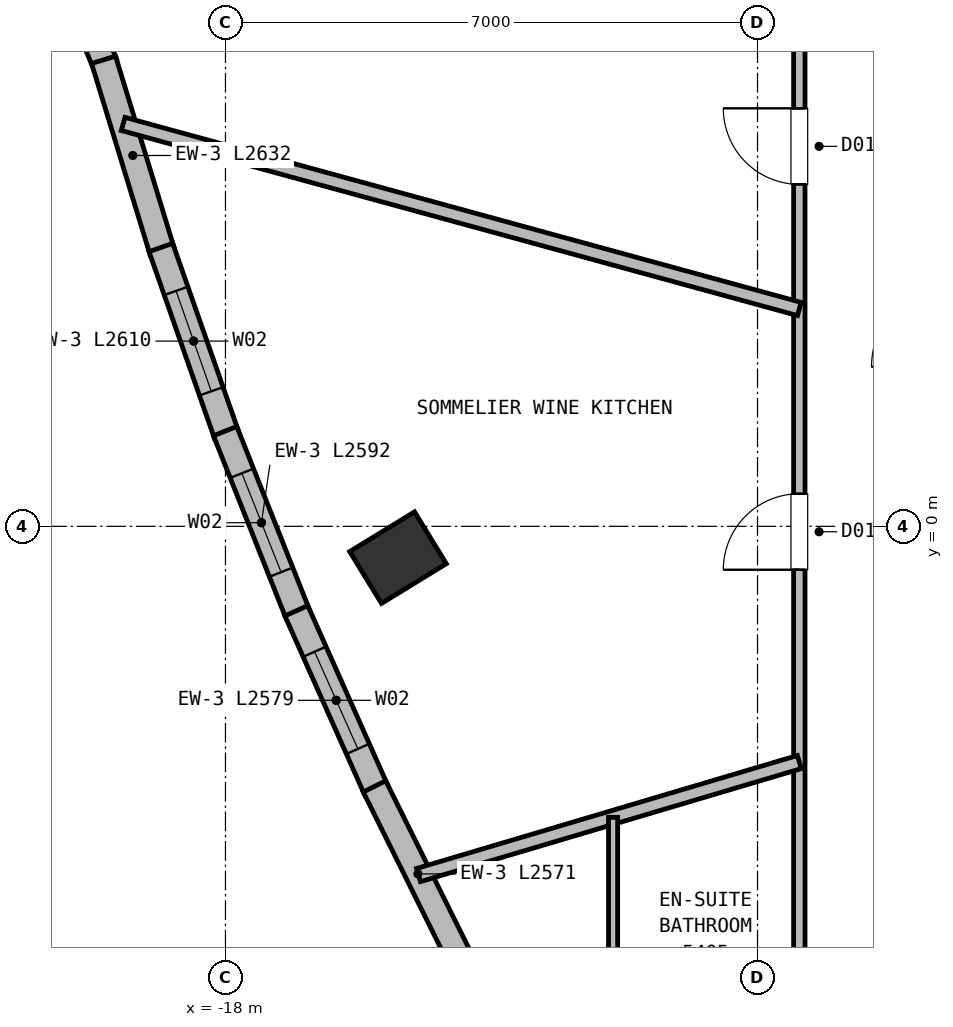
"""IFC4 building model, lengths in metres.
Left out: names, types, materials, properties, quantities, classifications, styles, units other than length and angle.
Written with IfcOpenShell. Run it as: python <this file> out.ifc"""

import sys

from ifc_helpers import new_model, si_unit, direction, frame, frame_2d, origin, origin_2d, place, context, subcontext, project, spatial, rectangle, extrude, element, fill, save


model = new_model("IFC4")
c1 = context("Model", 3, precision=1e-05, world=origin(), true_north=direction((0.0, 1.0)))
c2 = subcontext(c1, "Body", "Model", "MODEL_VIEW")
j1 = project(units=[si_unit("LENGTHUNIT", "METRE"), si_unit("PLANEANGLEUNIT", "RADIAN")], contexts=[c1])
p1 = place(None, origin())
s1 = spatial("IfcSite", under=j1, at=p1, CompositionType="ELEMENT")
p2 = place(p1, origin())
s2 = spatial("IfcBuilding", under=s1, at=p2, CompositionType="ELEMENT")
p3 = place(p2, frame((0.0, 0.0, 205.55)))
s3 = spatial("IfcBuildingStorey", under=s2, at=p3, CompositionType="ELEMENT", Elevation=205.55)
p4 = place(p3, frame((-15.73, -0.412, 0.0), z_axis=(0.0, 0.0, 1.0), x_axis=(-0.522498564716, 0.852640164354, 0.0)))
e1 = element("IfcColumn", 1, at=p4, inside=s3, PredefinedType="COLUMN", context=c2, shape_type="SweptSolid", body=[
    extrude(rectangle(XDim=0.8, YDim=1.0, at=origin_2d()), origin(), (0.0, 0.0, 1.0), 3.8),
])
p5 = place(p3, frame((-19.587, 6.091, 0.0), z_axis=(0.0, 0.0, 1.0), x_axis=(-0.382668413767, 0.923885753275, 0.0)))
e2 = element("IfcWall", 2, at=p5, inside=s3, PredefinedType="SOLIDWALL", context=c2, shape_type="SweptSolid", body=[
    extrude(rectangle(XDim=1.407, YDim=0.33, at=frame_2d((0.704, 0.0))), origin(), (0.0, 0.0, 1.0), 3.55),
])
p6 = place(p3, frame((-18.834, 3.621, 0.0), z_axis=(0.0, 0.0, 1.0), x_axis=(-0.292416512209, 0.956291055792, 0.0)))
e3 = element("IfcWall", 3, at=p6, inside=s3, PredefinedType="SOLIDWALL", context=c2, shape_type="SweptSolid", body=[
    extrude(rectangle(XDim=2.632, YDim=0.33, at=frame_2d((1.316, 0.0))), origin(), (0.0, 0.0, 1.0), 3.55),
])
p7 = place(p3, frame((-17.987, 1.206, 0.0), z_axis=(0.0, 0.0, 1.0), x_axis=(-0.330754550378, 0.94371681526, 0.0)))
e4 = element("IfcWall", 4, at=p7, inside=s3, PredefinedType="SOLIDWALL", context=c2, shape_type="SweptSolid", body=[
    extrude(rectangle(XDim=2.61, YDim=0.33, at=frame_2d((1.305, 0.0))), origin(), (0.0, 0.0, 1.0), 3.55),
])
p8 = place(p7, frame((0.605, 0.0, 0.72)))
e5 = element("IfcOpeningElement", 5, at=p8, cuts=e4, PredefinedType="OPENING", context=c2, shape_type="SweptSolid", body=[
    extrude(rectangle(XDim=1.4, YDim=1.84, at=frame_2d((0.7, 0.92))), frame((0.0, 0.175, 0.0), z_axis=(0.0, -1.0, 0.0), x_axis=(1.0, 0.0, 0.0)), (0.0, 0.0, 1.0), 0.35),
])
p9 = place(p3, frame((-17.048, -1.157, 0.0), z_axis=(0.0, 0.0, 1.0), x_axis=(-0.368872640276, 0.929479948819, 0.0)))
e6 = element("IfcWall", 6, at=p9, inside=s3, PredefinedType="SOLIDWALL", context=c2, shape_type="SweptSolid", body=[
    extrude(rectangle(XDim=2.593, YDim=0.33, at=frame_2d((1.296, 0.0))), origin(), (0.0, 0.0, 1.0), 3.55),
])
p10 = place(p9, frame((0.596, 0.0, 0.72)))
e7 = element("IfcOpeningElement", 7, at=p10, cuts=e6, PredefinedType="OPENING", context=c2, shape_type="SweptSolid", body=[
    extrude(rectangle(XDim=1.4, YDim=1.84, at=frame_2d((0.7, 0.92))), frame((0.0, 0.175, 0.0), z_axis=(0.0, -1.0, 0.0), x_axis=(1.0, 0.0, 0.0)), (0.0, 0.0, 1.0), 0.35),
])
p11 = place(p3, frame((-16.018, -3.467, 0.0), z_axis=(0.0, 0.0, 1.0), x_axis=(-0.40690235828, 0.913471658469, 0.0)))
e8 = element("IfcWall", 8, at=p11, inside=s3, PredefinedType="SOLIDWALL", context=c2, shape_type="SweptSolid", body=[
    extrude(rectangle(XDim=2.579, YDim=0.33, at=frame_2d((1.29, 0.0))), origin(), (0.0, 0.0, 1.0), 3.55),
])
p12 = place(p11, frame((0.59, 0.0, 0.72)))
e9 = element("IfcOpeningElement", 9, at=p12, cuts=e8, PredefinedType="OPENING", context=c2, shape_type="SweptSolid", body=[
    extrude(rectangle(XDim=1.4, YDim=1.84, at=frame_2d((0.7, 0.92))), frame((0.0, 0.175, 0.0), z_axis=(0.0, -1.0, 0.0), x_axis=(1.0, 0.0, 0.0)), (0.0, 0.0, 1.0), 0.35),
])
p13 = place(p3, frame((-14.896, -5.725, 0.0), z_axis=(0.0, 0.0, 1.0), x_axis=(-0.444590292188, 0.895734040936, 0.0)))
e10 = element("IfcWall", 10, at=p13, inside=s3, PredefinedType="SOLIDWALL", context=c2, shape_type="SweptSolid", body=[
    extrude(rectangle(XDim=2.571, YDim=0.33, at=frame_2d((1.285, 0.0))), origin(), (0.0, 0.0, 1.0), 3.55),
])
p14 = place(p3, frame((-10.45, -7.24, 0.0), z_axis=(0.0, 0.0, 1.0), x_axis=(0.0, 1.0, 0.0)))
e11 = element("IfcWall", 11, at=p14, inside=s3, PredefinedType="PARTITIONING", context=c2, shape_type="SweptSolid", body=[
    extrude(rectangle(XDim=14.48, YDim=0.15, at=frame_2d((7.24, 0.0))), origin(), (0.0, 0.0, 1.0), 3.23),
])
p15 = place(p14, frame((6.669, 0.0, 0.0)))
e12 = element("IfcOpeningElement", 12, at=p15, cuts=e11, PredefinedType="OPENING", context=c2, shape_type="SweptSolid", body=[
    extrude(rectangle(XDim=1.0, YDim=2.15, at=frame_2d((0.5, 1.075))), frame((0.0, 0.085, 0.0), z_axis=(0.0, -1.0, 0.0), x_axis=(1.0, 0.0, 0.0)), (0.0, 0.0, 1.0), 0.17),
])
p16 = place(p14, frame((11.74, 0.0, 0.0)))
e13 = element("IfcOpeningElement", 13, at=p16, cuts=e11, PredefinedType="OPENING", context=c2, shape_type="SweptSolid", body=[
    extrude(rectangle(XDim=1.0, YDim=2.15, at=frame_2d((0.5, 1.075))), frame((0.0, 0.085, 0.0), z_axis=(0.0, -1.0, 0.0), x_axis=(1.0, 0.0, 0.0)), (0.0, 0.0, 1.0), 0.17),
])
p17 = place(p3, frame((-10.45, 2.86, 0.0), z_axis=(0.0, 0.0, 1.0), x_axis=(-0.964534389735, 0.26395721437, 0.0)))
e14 = element("IfcWall", 14, at=p17, inside=s3, PredefinedType="PARTITIONING", context=c2, shape_type="SweptSolid", body=[
    extrude(rectangle(XDim=9.223, YDim=0.18, at=frame_2d((4.612, 0.0))), origin(), (0.0, 0.0, 1.0), 3.55),
])
p18 = place(p3, frame((-10.45, -3.102, 0.0), z_axis=(0.0, 0.0, 1.0), x_axis=(-0.958678324952, -0.284492300894, 0.0)))
e15 = element("IfcWall", 15, at=p18, inside=s3, PredefinedType="PARTITIONING", context=c2, shape_type="SweptSolid", body=[
    extrude(rectangle(XDim=5.226, YDim=0.18, at=frame_2d((2.613, 0.0))), origin(), (0.0, 0.0, 1.0), 3.55),
])
p19 = place(p3, frame((-12.9, -3.829, 0.0), z_axis=(0.0, 0.0, 1.0), x_axis=(0.0, -1.0, 0.0)))
e16 = element("IfcWall", 16, at=p19, inside=s3, PredefinedType="PARTITIONING", context=c2, shape_type="SweptSolid", body=[
    extrude(rectangle(XDim=2.931, YDim=0.12, at=frame_2d((1.465, 0.0))), origin(), (0.0, 0.0, 1.0), 3.55),
])
p20 = place(p8, origin())
e17 = element("IfcWindow", 17, at=p20, inside=s3, PartitioningType="SINGLE_PANEL", PredefinedType="WINDOW", context=c2, shape_type="SweptSolid", body=[
    extrude(rectangle(XDim=1.4, YDim=1.84, at=frame_2d((0.7, 0.92))), frame((0.0, 0.03, 0.0), z_axis=(0.0, -1.0, 0.0), x_axis=(1.0, 0.0, 0.0)), (0.0, 0.0, 1.0), 0.06),
])
fill(e5, e17)
p21 = place(p10, origin())
e18 = element("IfcWindow", 18, at=p21, inside=s3, PartitioningType="SINGLE_PANEL", PredefinedType="WINDOW", context=c2, shape_type="SweptSolid", body=[
    extrude(rectangle(XDim=1.4, YDim=1.84, at=frame_2d((0.7, 0.92))), frame((0.0, 0.03, 0.0), z_axis=(0.0, -1.0, 0.0), x_axis=(1.0, 0.0, 0.0)), (0.0, 0.0, 1.0), 0.06),
])
fill(e7, e18)
p22 = place(p12, origin())
e19 = element("IfcWindow", 19, at=p22, inside=s3, PartitioningType="SINGLE_PANEL", PredefinedType="WINDOW", context=c2, shape_type="SweptSolid", body=[
    extrude(rectangle(XDim=1.4, YDim=1.84, at=frame_2d((0.7, 0.92))), frame((0.0, 0.03, 0.0), z_axis=(0.0, -1.0, 0.0), x_axis=(1.0, 0.0, 0.0)), (0.0, 0.0, 1.0), 0.06),
])
fill(e9, e19)
p23 = place(p15, origin())
e20 = element("IfcDoor", 20, at=p23, inside=s3, OperationType="SINGLE_SWING_LEFT", PredefinedType="DOOR", context=c2, shape_type="SweptSolid", body=[
    extrude(rectangle(XDim=1.0, YDim=2.15, at=frame_2d((0.5, 1.075))), frame((0.0, 0.025, 0.0), z_axis=(0.0, -1.0, 0.0), x_axis=(1.0, 0.0, 0.0)), (0.0, 0.0, 1.0), 0.05),
])
fill(e12, e20)
p24 = place(p16, origin())
e21 = element("IfcDoor", 21, at=p24, inside=s3, OperationType="SINGLE_SWING_RIGHT", PredefinedType="DOOR", context=c2, shape_type="SweptSolid", body=[
    extrude(rectangle(XDim=1.0, YDim=2.15, at=frame_2d((0.5, 1.075))), frame((0.0, 0.025, 0.0), z_axis=(0.0, -1.0, 0.0), x_axis=(1.0, 0.0, 0.0)), (0.0, 0.0, 1.0), 0.05),
])
fill(e13, e21)
save(model, sys.argv[1])
